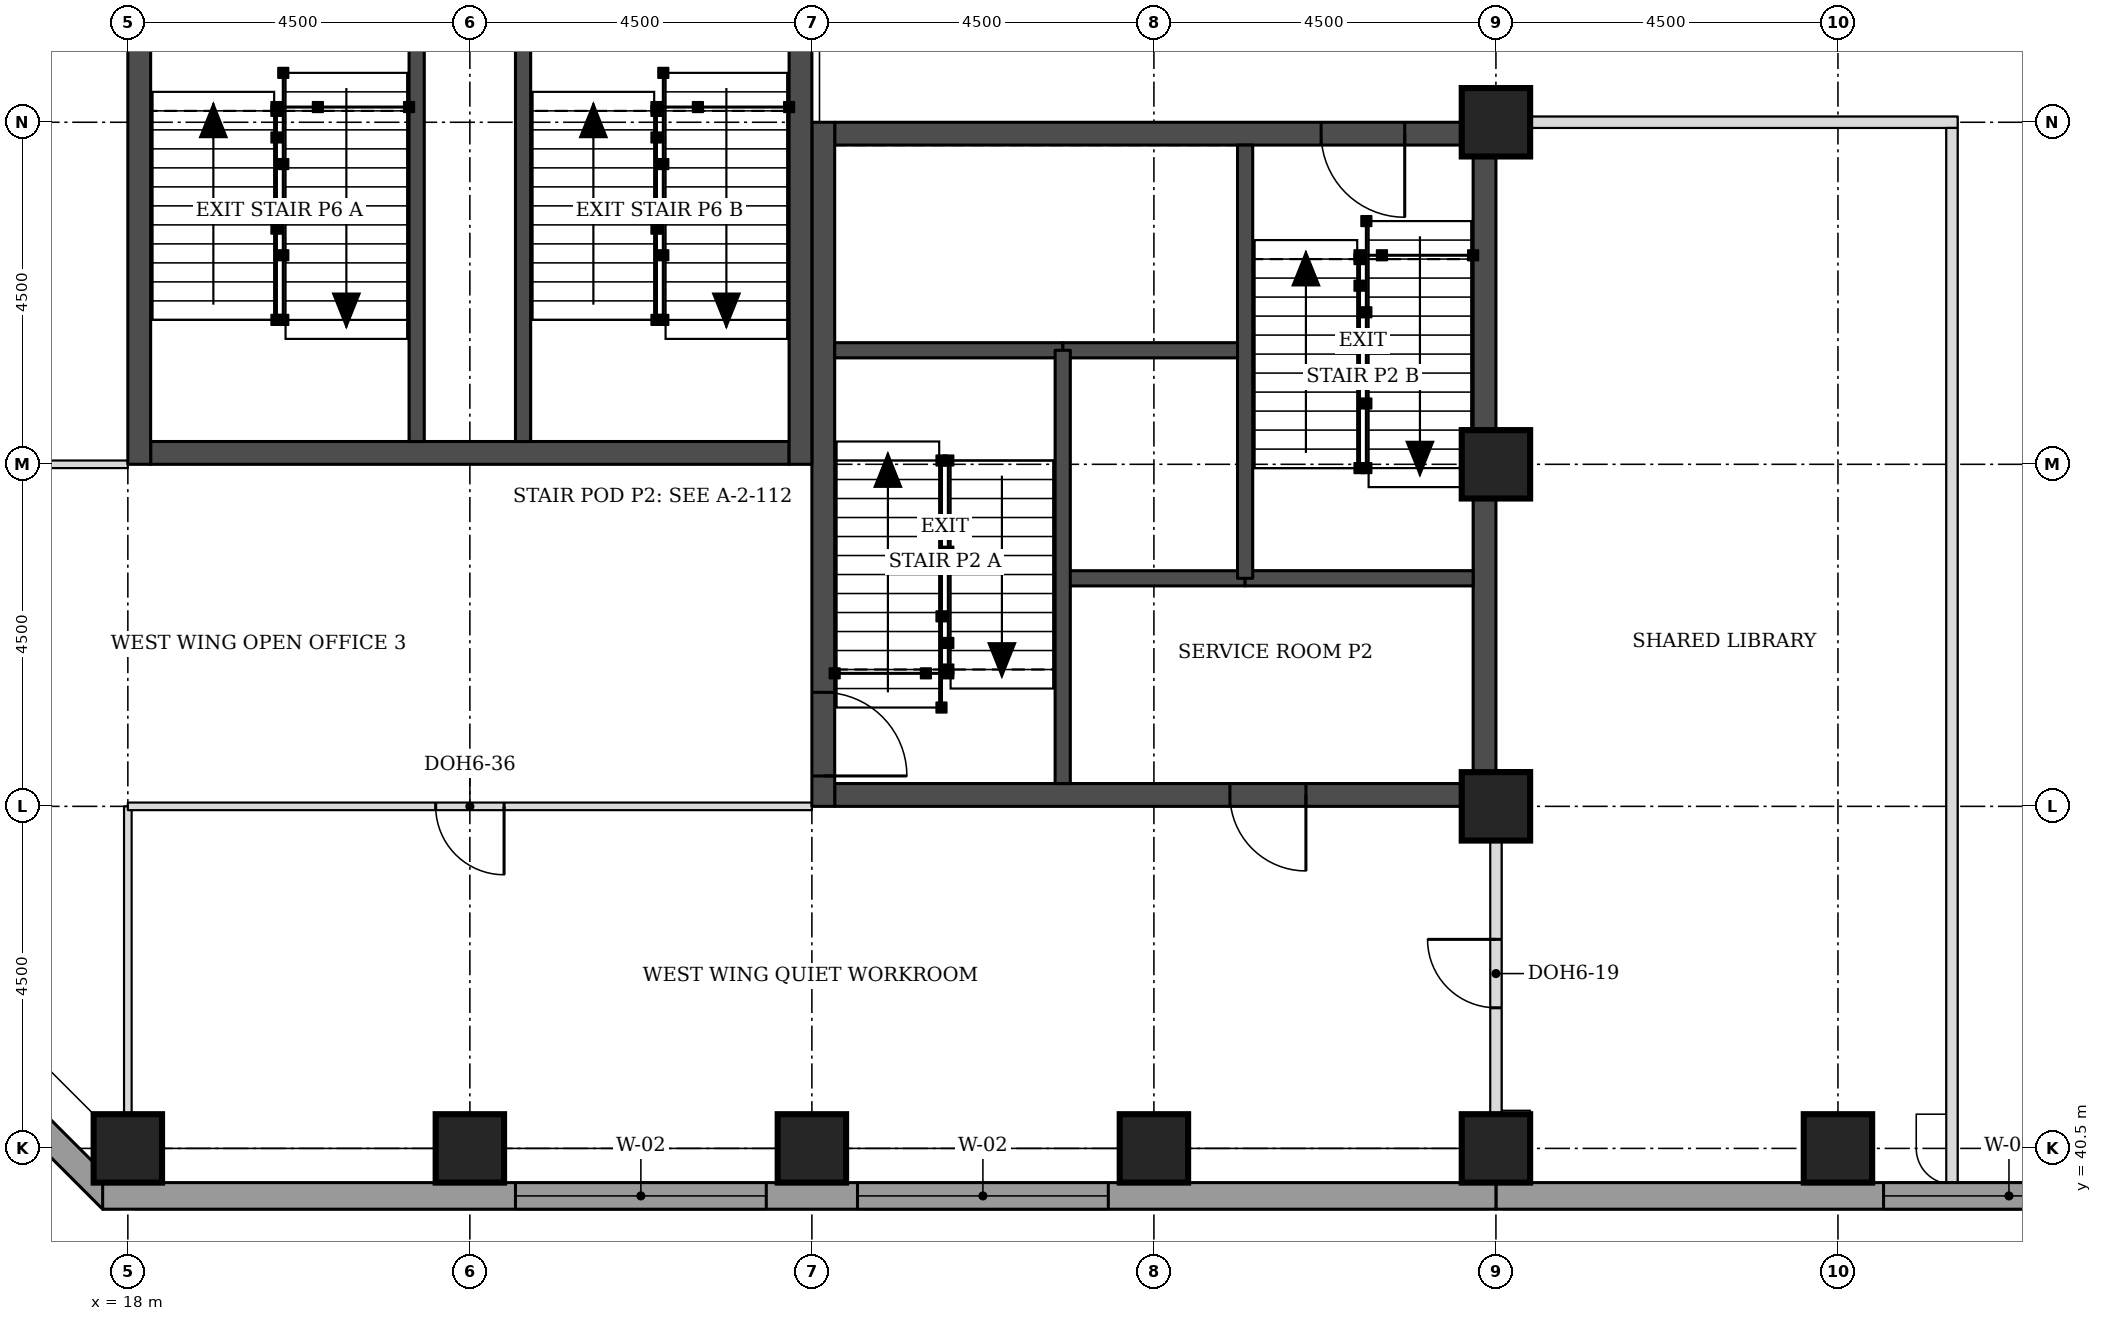
"""IFC4 building model, lengths in metres.
Left out: names, types, materials, properties, quantities, classifications, styles, units other than length and angle.
Written with IfcOpenShell. Run it as: python <this file> out.ifc"""

import sys

from ifc_helpers import new_model, si_unit, direction, frame, frame_2d, origin, origin_2d, place, context, subcontext, project, spatial, rectangle, extrude, element, fill, save


model = new_model("IFC4")
c1 = context("Model", 3, precision=1e-05, world=origin(), true_north=direction((0.0, 1.0)))
c2 = subcontext(c1, "Body", "Model", "MODEL_VIEW")
j1 = project(units=[si_unit("LENGTHUNIT", "METRE"), si_unit("PLANEANGLEUNIT", "RADIAN")], contexts=[c1])
p1 = place(None, origin())
s1 = spatial("IfcSite", under=j1, at=p1, CompositionType="ELEMENT")
p2 = place(p1, origin())
s2 = spatial("IfcBuilding", under=s1, at=p2, CompositionType="ELEMENT")
p3 = place(p2, frame((0.0, 0.0, 188.4)))
s3 = spatial("IfcBuildingStorey", under=s2, at=p3, CompositionType="ELEMENT", Elevation=188.4)
for number, where, z_axis, x_axis in (
    (1, (18.0, 40.5, 0.0), (0.0, 0.0, 1.0), (1.0, 0.0, 0.0)),
    (2, (22.5, 40.5, 0.0), (0.0, 0.0, 1.0), (1.0, 0.0, 0.0)),
    (3, (27.0, 40.5, 0.0), (0.0, 0.0, 1.0), (1.0, 0.0, 0.0)),
    (4, (31.5, 40.5, 0.0), (0.0, 0.0, 1.0), (1.0, 0.0, 0.0)),
    (5, (36.0, 40.5, 0.0), (0.0, 0.0, 1.0), (1.0, 0.0, 0.0)),
    (6, (40.5, 40.5, 0.0), (0.0, 0.0, 1.0), (1.0, 0.0, 0.0)),
    (7, (36.0, 45.0, 0.0), (0.0, 0.0, 1.0), (1.0, 0.0, 0.0)),
    (8, (36.0, 49.5, 0.0), (0.0, 0.0, 1.0), (1.0, 0.0, 0.0)),
    (9, (36.0, 54.0, 0.0), (0.0, 0.0, 1.0), (1.0, 0.0, 0.0)),
):
    element("IfcColumn", number, at=place(p3, frame(where, z_axis=z_axis, x_axis=x_axis)), inside=s3, PredefinedType="COLUMN", context=c2, shape_type="SweptSolid", body=[
        extrude(rectangle(XDim=0.9, YDim=0.9, at=origin_2d()), origin(), (0.0, 0.0, 1.0), 3.7),
    ])
p4 = place(p3, frame((27.3, 45.15, 0.0), z_axis=(0.0, 0.0, 1.0), x_axis=(1.0, 0.0, 0.0)))
e10 = element("IfcWall", 10, at=p4, inside=s3, PredefinedType="SHEAR", context=c2, shape_type="SweptSolid", body=[
    extrude(rectangle(XDim=8.4, YDim=0.3, at=frame_2d((4.2, 0.0))), origin(), (0.0, 0.0, 1.0), 3.7),
])
p5 = place(p4, frame((5.2, 0.0, 0.0)))
e11 = element("IfcOpeningElement", 11, at=p5, cuts=e10, PredefinedType="OPENING", context=c2, shape_type="SweptSolid", body=[
    extrude(rectangle(XDim=1.0, YDim=2.1, at=frame_2d((0.5, 1.05))), frame((0.0, 0.16, 0.0), z_axis=(0.0, -1.0, 0.0), x_axis=(1.0, 0.0, 0.0)), (0.0, 0.0, 1.0), 0.32),
])
p6 = place(p3, frame((27.3, 53.85, 0.0), z_axis=(0.0, 0.0, 1.0), x_axis=(1.0, 0.0, 0.0)))
e12 = element("IfcWall", 12, at=p6, inside=s3, PredefinedType="SHEAR", context=c2, shape_type="SweptSolid", body=[
    extrude(rectangle(XDim=8.4, YDim=0.3, at=frame_2d((4.2, 0.0))), origin(), (0.0, 0.0, 1.0), 3.7),
])
p7 = place(p6, frame((6.4, 0.0, 0.0)))
e13 = element("IfcOpeningElement", 13, at=p7, cuts=e12, PredefinedType="OPENING", context=c2, shape_type="SweptSolid", body=[
    extrude(rectangle(XDim=1.1, YDim=2.1, at=frame_2d((0.55, 1.05))), frame((0.0, 0.16, 0.0), z_axis=(0.0, -1.0, 0.0), x_axis=(1.0, 0.0, 0.0)), (0.0, 0.0, 1.0), 0.32),
])
p8 = place(p3, frame((27.15, 45.0, 0.0), z_axis=(0.0, 0.0, 1.0), x_axis=(0.0, 1.0, 0.0)))
e14 = element("IfcWall", 14, at=p8, inside=s3, PredefinedType="SHEAR", context=c2, shape_type="SweptSolid", body=[
    extrude(rectangle(XDim=9.0, YDim=0.3, at=frame_2d((4.5, 0.0))), origin(), (0.0, 0.0, 1.0), 3.7),
])
p9 = place(p8, frame((0.4, 0.0, 0.0)))
e15 = element("IfcOpeningElement", 15, at=p9, cuts=e14, PredefinedType="OPENING", context=c2, shape_type="SweptSolid", body=[
    extrude(rectangle(XDim=1.1, YDim=2.1, at=frame_2d((0.55, 1.05))), frame((0.0, 0.16, 0.0), z_axis=(0.0, -1.0, 0.0), x_axis=(1.0, 0.0, 0.0)), (0.0, 0.0, 1.0), 0.32),
])
p10 = place(p3, frame((35.85, 45.0, 0.0), z_axis=(0.0, 0.0, 1.0), x_axis=(0.0, 1.0, 0.0)))
e16 = element("IfcWall", 16, at=p10, inside=s3, PredefinedType="SHEAR", context=c2, shape_type="SweptSolid", body=[
    extrude(rectangle(XDim=9.0, YDim=0.3, at=frame_2d((4.5, 0.0))), origin(), (0.0, 0.0, 1.0), 3.7),
])
p11 = place(p3, frame((18.3, 49.65, 0.0), z_axis=(0.0, 0.0, 1.0), x_axis=(1.0, 0.0, 0.0)))
e17 = element("IfcWall", 17, at=p11, inside=s3, PredefinedType="SHEAR", context=c2, shape_type="SweptSolid", body=[
    extrude(rectangle(XDim=8.4, YDim=0.3, at=frame_2d((4.2, 0.0))), origin(), (0.0, 0.0, 1.0), 3.7),
])
p12 = place(p3, frame((18.15, 49.5, 0.0), z_axis=(0.0, 0.0, 1.0), x_axis=(0.0, 1.0, 0.0)))
e18 = element("IfcWall", 18, at=p12, inside=s3, PredefinedType="SHEAR", context=c2, shape_type="SweptSolid", body=[
    extrude(rectangle(XDim=9.0, YDim=0.3, at=frame_2d((4.5, 0.0))), origin(), (0.0, 0.0, 1.0), 3.7),
])
p13 = place(p3, frame((26.85, 49.5, 0.0), z_axis=(0.0, 0.0, 1.0), x_axis=(0.0, 1.0, 0.0)))
e19 = element("IfcWall", 19, at=p13, inside=s3, PredefinedType="SHEAR", context=c2, shape_type="SweptSolid", body=[
    extrude(rectangle(XDim=9.0, YDim=0.3, at=frame_2d((4.5, 0.0))), origin(), (0.0, 0.0, 1.0), 3.7),
])
p14 = place(p13, frame((6.6, 0.0, 0.0)))
e20 = element("IfcOpeningElement", 20, at=p14, cuts=e19, PredefinedType="OPENING", context=c2, shape_type="SweptSolid", body=[
    extrude(rectangle(XDim=1.8, YDim=2.1, at=frame_2d((0.9, 1.05))), frame((0.0, 0.16, 0.0), z_axis=(0.0, -1.0, 0.0), x_axis=(1.0, 0.0, 0.0)), (0.0, 0.0, 1.0), 0.32),
])
p15 = place(p3, frame((36.0, 39.875, 0.0), z_axis=(0.0, 0.0, 1.0), x_axis=(1.0, 0.0, 0.0)))
e21 = element("IfcWall", 21, at=p15, inside=s3, PredefinedType="STANDARD", context=c2, shape_type="SweptSolid", body=[
    extrude(rectangle(XDim=36.331, YDim=0.35, at=frame_2d((18.166, 0.0))), origin(), (0.0, 0.0, 1.0), 3.525),
])
p16 = place(p15, frame((5.1, 0.0, 0.9)))
e22 = element("IfcOpeningElement", 22, at=p16, cuts=e21, PredefinedType="OPENING", context=c2, shape_type="SweptSolid", body=[
    extrude(rectangle(XDim=3.3, YDim=1.9, at=frame_2d((1.65, 0.95))), frame((0.0, 0.185, 0.0), z_axis=(0.0, -1.0, 0.0), x_axis=(1.0, 0.0, 0.0)), (0.0, 0.0, 1.0), 0.37),
])
p17 = place(p15, frame((9.6, 0.0, 0.9)))
e23 = element("IfcOpeningElement", 23, at=p17, cuts=e21, PredefinedType="OPENING", context=c2, shape_type="SweptSolid", body=[
    extrude(rectangle(XDim=3.3, YDim=1.9, at=frame_2d((1.65, 0.95))), frame((0.0, 0.185, 0.0), z_axis=(0.0, -1.0, 0.0), x_axis=(1.0, 0.0, 0.0)), (0.0, 0.0, 1.0), 0.37),
])
p18 = place(p15, frame((14.1, 0.0, 0.9)))
e24 = element("IfcOpeningElement", 24, at=p18, cuts=e21, PredefinedType="OPENING", context=c2, shape_type="SweptSolid", body=[
    extrude(rectangle(XDim=3.3, YDim=1.9, at=frame_2d((1.65, 0.95))), frame((0.0, 0.185, 0.0), z_axis=(0.0, -1.0, 0.0), x_axis=(1.0, 0.0, 0.0)), (0.0, 0.0, 1.0), 0.37),
])
p19 = place(p15, frame((18.6, 0.0, 0.9)))
e25 = element("IfcOpeningElement", 25, at=p19, cuts=e21, PredefinedType="OPENING", context=c2, shape_type="SweptSolid", body=[
    extrude(rectangle(XDim=3.3, YDim=1.9, at=frame_2d((1.65, 0.95))), frame((0.0, 0.185, 0.0), z_axis=(0.0, -1.0, 0.0), x_axis=(1.0, 0.0, 0.0)), (0.0, 0.0, 1.0), 0.37),
])
p20 = place(p15, frame((23.1, 0.0, 0.9)))
e26 = element("IfcOpeningElement", 26, at=p20, cuts=e21, PredefinedType="OPENING", context=c2, shape_type="SweptSolid", body=[
    extrude(rectangle(XDim=3.3, YDim=1.9, at=frame_2d((1.65, 0.95))), frame((0.0, 0.185, 0.0), z_axis=(0.0, -1.0, 0.0), x_axis=(1.0, 0.0, 0.0)), (0.0, 0.0, 1.0), 0.37),
])
p21 = place(p15, frame((27.6, 0.0, 0.9)))
e27 = element("IfcOpeningElement", 27, at=p21, cuts=e21, PredefinedType="OPENING", context=c2, shape_type="SweptSolid", body=[
    extrude(rectangle(XDim=3.3, YDim=1.9, at=frame_2d((1.65, 0.95))), frame((0.0, 0.185, 0.0), z_axis=(0.0, -1.0, 0.0), x_axis=(1.0, 0.0, 0.0)), (0.0, 0.0, 1.0), 0.37),
])
p22 = place(p3, frame((12.824, 44.792, 0.0), z_axis=(0.0, 0.0, 1.0), x_axis=(0.707106781187, -0.707106781187, 0.0)))
e28 = element("IfcWall", 28, at=p22, inside=s3, PredefinedType="STANDARD", context=c2, shape_type="SweptSolid", body=[
    extrude(rectangle(XDim=7.027, YDim=0.35, at=frame_2d((3.513, 0.0))), origin(), (0.0, 0.0, 1.0), 3.525),
])
p23 = place(p22, frame((1.863, 0.0, 0.9)))
e29 = element("IfcOpeningElement", 29, at=p23, cuts=e28, PredefinedType="OPENING", context=c2, shape_type="SweptSolid", body=[
    extrude(rectangle(XDim=3.3, YDim=1.9, at=frame_2d((1.65, 0.95))), frame((0.0, 0.185, 0.0), z_axis=(0.0, -1.0, 0.0), x_axis=(1.0, 0.0, 0.0)), (0.0, 0.0, 1.0), 0.37),
])
p24 = place(p3, frame((17.669, 39.875, 0.0), z_axis=(0.0, 0.0, 1.0), x_axis=(1.0, 0.0, 0.0)))
e30 = element("IfcWall", 30, at=p24, inside=s3, PredefinedType="STANDARD", context=c2, shape_type="SweptSolid", body=[
    extrude(rectangle(XDim=18.331, YDim=0.35, at=frame_2d((9.166, 0.0))), origin(), (0.0, 0.0, 1.0), 3.525),
])
p25 = place(p24, frame((5.431, 0.0, 0.9)))
e31 = element("IfcOpeningElement", 31, at=p25, cuts=e30, PredefinedType="OPENING", context=c2, shape_type="SweptSolid", body=[
    extrude(rectangle(XDim=3.3, YDim=1.9, at=frame_2d((1.65, 0.95))), frame((0.0, 0.185, 0.0), z_axis=(0.0, -1.0, 0.0), x_axis=(1.0, 0.0, 0.0)), (0.0, 0.0, 1.0), 0.37),
])
p26 = place(p24, frame((9.931, 0.0, 0.9)))
e32 = element("IfcOpeningElement", 32, at=p26, cuts=e30, PredefinedType="OPENING", context=c2, shape_type="SweptSolid", body=[
    extrude(rectangle(XDim=3.3, YDim=1.9, at=frame_2d((1.65, 0.95))), frame((0.0, 0.185, 0.0), z_axis=(0.0, -1.0, 0.0), x_axis=(1.0, 0.0, 0.0)), (0.0, 0.0, 1.0), 0.37),
])
p27 = place(p3, frame((36.45, 54.0, 0.0), z_axis=(0.0, 0.0, 1.0), x_axis=(1.0, 0.0, 0.0)))
e33 = element("IfcWall", 33, at=p27, inside=s3, PredefinedType="PARTITIONING", context=c2, shape_type="SweptSolid", body=[
    extrude(rectangle(XDim=5.625, YDim=0.15, at=frame_2d((2.812, 0.0))), origin(), (0.0, 0.0, 1.0), 3.55),
])
p28 = place(p3, frame((42.0, 40.05, 0.0), z_axis=(0.0, 0.0, 1.0), x_axis=(0.0, 1.0, 0.0)))
e34 = element("IfcWall", 34, at=p28, inside=s3, PredefinedType="PARTITIONING", context=c2, shape_type="SweptSolid", body=[
    extrude(rectangle(XDim=13.875, YDim=0.15, at=frame_2d((6.938, 0.0))), origin(), (0.0, 0.0, 1.0), 3.55),
])
p29 = place(p3, frame((36.0, 40.95, 0.0), z_axis=(0.0, 0.0, 1.0), x_axis=(0.0, 1.0, 0.0)))
e35 = element("IfcWall", 35, at=p29, inside=s3, PredefinedType="PARTITIONING", context=c2, shape_type="SweptSolid", body=[
    extrude(rectangle(XDim=3.63, YDim=0.15, at=frame_2d((1.815, 0.0))), origin(), (0.0, 0.0, 1.0), 2.8),
])
p30 = place(p29, frame((1.4, 0.0, 0.0)))
e36 = element("IfcOpeningElement", 36, at=p30, cuts=e35, PredefinedType="OPENING", context=c2, shape_type="SweptSolid", body=[
    extrude(rectangle(XDim=0.9, YDim=2.1, at=frame_2d((0.45, 1.05))), frame((0.0, 0.085, 0.0), z_axis=(0.0, -1.0, 0.0), x_axis=(1.0, 0.0, 0.0)), (0.0, 0.0, 1.0), 0.17),
])
p31 = place(p3, frame((13.5, 49.5, 0.0), z_axis=(0.0, 0.0, 1.0), x_axis=(1.0, 0.0, 0.0)))
e37 = element("IfcWall", 37, at=p31, inside=s3, PredefinedType="PARTITIONING", context=c2, shape_type="SweptSolid", body=[
    extrude(rectangle(XDim=4.5, YDim=0.1, at=frame_2d((2.25, 0.0))), origin(), (0.0, 0.0, 1.0), 3.55),
])
p32 = place(p31, frame((1.8, 0.0, 0.0)))
e38 = element("IfcOpeningElement", 38, at=p32, cuts=e37, PredefinedType="OPENING", context=c2, shape_type="SweptSolid", body=[
    extrude(rectangle(XDim=0.9, YDim=2.1, at=frame_2d((0.45, 1.05))), frame((0.0, 0.06, 0.0), z_axis=(0.0, -1.0, 0.0), x_axis=(1.0, 0.0, 0.0)), (0.0, 0.0, 1.0), 0.12),
])
p33 = place(p3, frame((18.0, 40.5, 0.0), z_axis=(0.0, 0.0, 1.0), x_axis=(0.0, 1.0, 0.0)))
e39 = element("IfcWall", 39, at=p33, inside=s3, PredefinedType="PARTITIONING", context=c2, shape_type="SweptSolid", body=[
    extrude(rectangle(XDim=4.5, YDim=0.1, at=frame_2d((2.25, 0.0))), origin(), (0.0, 0.0, 1.0), 3.55),
])
p34 = place(p3, frame((18.0, 45.0, 0.0), z_axis=(0.0, 0.0, 1.0), x_axis=(1.0, 0.0, 0.0)))
e40 = element("IfcWall", 40, at=p34, inside=s3, PredefinedType="PARTITIONING", context=c2, shape_type="SweptSolid", body=[
    extrude(rectangle(XDim=9.0, YDim=0.1, at=frame_2d((4.5, 0.0))), origin(), (0.0, 0.0, 1.0), 2.55),
])
p35 = place(p34, frame((4.05, 0.0, 0.0)))
e41 = element("IfcOpeningElement", 41, at=p35, cuts=e40, PredefinedType="OPENING", context=c2, shape_type="SweptSolid", body=[
    extrude(rectangle(XDim=0.9, YDim=2.1, at=frame_2d((0.45, 1.05))), frame((0.0, 0.06, 0.0), z_axis=(0.0, -1.0, 0.0), x_axis=(1.0, 0.0, 0.0)), (0.0, 0.0, 1.0), 0.12),
])
p36 = place(p3, frame((30.3, 48.0, 0.0), z_axis=(0.0, 0.0, 1.0), x_axis=(1.0, 0.0, 0.0)))
e42 = element("IfcWall", 42, at=p36, inside=s3, PredefinedType="SOLIDWALL", context=c2, shape_type="SweptSolid", body=[
    extrude(rectangle(XDim=2.4, YDim=0.2, at=frame_2d((1.2, 0.0))), origin(), (0.0, 0.0, 1.0), 3.55),
])
p37 = place(p3, frame((32.7, 48.0, 0.0), z_axis=(0.0, 0.0, 1.0), x_axis=(1.0, 0.0, 0.0)))
e43 = element("IfcWall", 43, at=p37, inside=s3, PredefinedType="SOLIDWALL", context=c2, shape_type="SweptSolid", body=[
    extrude(rectangle(XDim=3.0, YDim=0.2, at=frame_2d((1.5, 0.0))), origin(), (0.0, 0.0, 1.0), 3.55),
])
p38 = place(p3, frame((30.3, 51.0, 0.0), z_axis=(0.0, 0.0, 1.0), x_axis=(1.0, 0.0, 0.0)))
e44 = element("IfcWall", 44, at=p38, inside=s3, PredefinedType="SOLIDWALL", context=c2, shape_type="SweptSolid", body=[
    extrude(rectangle(XDim=2.4, YDim=0.2, at=frame_2d((1.2, 0.0))), origin(), (0.0, 0.0, 1.0), 3.7),
])
p39 = place(p3, frame((27.3, 51.0, 0.0), z_axis=(0.0, 0.0, 1.0), x_axis=(1.0, 0.0, 0.0)))
e45 = element("IfcWall", 45, at=p39, inside=s3, PredefinedType="SOLIDWALL", context=c2, shape_type="SweptSolid", body=[
    extrude(rectangle(XDim=3.0, YDim=0.2, at=frame_2d((1.5, 0.0))), origin(), (0.0, 0.0, 1.0), 3.55),
])
for number, where, z_axis, x_axis in (
    (46, (30.3, 45.3, 0.0), (0.0, 0.0, 1.0), (0.0, 1.0, 0.0)),
    (47, (32.7, 48.0, 0.0), (0.0, 0.0, 1.0), (0.0, 1.0, 0.0)),
):
    element("IfcWall", number, at=place(p3, frame(where, z_axis=z_axis, x_axis=x_axis)), inside=s3, PredefinedType="SOLIDWALL", context=c2, shape_type="SweptSolid", body=[
        extrude(rectangle(XDim=5.7, YDim=0.2, at=frame_2d((2.85, 0.0))), origin(), (0.0, 0.0, 1.0), 3.55),
    ])
for number, where, z_axis, x_axis in (
    (48, (21.8, 49.8, 0.0), (0.0, 0.0, 1.0), (0.0, 1.0, 0.0)),
    (49, (23.2, 49.8, 0.0), (0.0, 0.0, 1.0), (0.0, 1.0, 0.0)),
):
    element("IfcWall", number, at=place(p3, frame(where, z_axis=z_axis, x_axis=x_axis)), inside=s3, PredefinedType="SOLIDWALL", context=c2, shape_type="SweptSolid", body=[
        extrude(rectangle(XDim=6.05, YDim=0.2, at=frame_2d((3.025, 0.0))), origin(), (0.0, 0.0, 1.0), 3.55),
    ])
p40 = place(p16, origin())
e50 = element("IfcWindow", 50, at=p40, inside=s3, PartitioningType="SINGLE_PANEL", PredefinedType="WINDOW", context=c2, shape_type="SweptSolid", body=[
    extrude(rectangle(XDim=3.3, YDim=1.9, at=frame_2d((1.65, 0.95))), frame((0.0, 0.085, 0.0), z_axis=(0.0, -1.0, 0.0), x_axis=(1.0, 0.0, 0.0)), (0.0, 0.0, 1.0), 0.06),
])
fill(e22, e50)
p41 = place(p25, origin())
e51 = element("IfcWindow", 51, at=p41, inside=s3, PartitioningType="SINGLE_PANEL", PredefinedType="WINDOW", context=c2, shape_type="SweptSolid", body=[
    extrude(rectangle(XDim=3.3, YDim=1.9, at=frame_2d((1.65, 0.95))), frame((0.0, 0.085, 0.0), z_axis=(0.0, -1.0, 0.0), x_axis=(1.0, 0.0, 0.0)), (0.0, 0.0, 1.0), 0.06),
])
fill(e31, e51)
p42 = place(p26, origin())
e52 = element("IfcWindow", 52, at=p42, inside=s3, PartitioningType="SINGLE_PANEL", PredefinedType="WINDOW", context=c2, shape_type="SweptSolid", body=[
    extrude(rectangle(XDim=3.3, YDim=1.9, at=frame_2d((1.65, 0.95))), frame((0.0, 0.085, 0.0), z_axis=(0.0, -1.0, 0.0), x_axis=(1.0, 0.0, 0.0)), (0.0, 0.0, 1.0), 0.06),
])
fill(e32, e52)
p43 = place(p30, origin())
e53 = element("IfcDoor", 53, at=p43, inside=s3, OperationType="SINGLE_SWING_RIGHT", PredefinedType="DOOR", context=c2, shape_type="SweptSolid", body=[
    extrude(rectangle(XDim=0.9, YDim=2.1, at=frame_2d((0.45, 1.05))), frame((0.0, 0.025, 0.0), z_axis=(0.0, -1.0, 0.0), x_axis=(1.0, 0.0, 0.0)), (0.0, 0.0, 1.0), 0.05),
])
fill(e36, e53)
p44 = place(p35, frame((0.9, 0.0, 0.0), z_axis=(0.0, 0.0, 1.0), x_axis=(-1.0, 0.0, 0.0)))
e54 = element("IfcDoor", 54, at=p44, inside=s3, OperationType="SINGLE_SWING_LEFT", PredefinedType="DOOR", context=c2, shape_type="SweptSolid", body=[
    extrude(rectangle(XDim=0.9, YDim=2.1, at=frame_2d((0.45, 1.05))), frame((0.0, 0.025, 0.0), z_axis=(0.0, -1.0, 0.0), x_axis=(1.0, 0.0, 0.0)), (0.0, 0.0, 1.0), 0.05),
])
fill(e41, e54)
p45 = place(p9, frame((1.1, 0.0, 0.0), z_axis=(0.0, 0.0, 1.0), x_axis=(-1.0, 0.0, 0.0)))
e55 = element("IfcDoor", 55, at=p45, inside=s3, OperationType="SINGLE_SWING_RIGHT", PredefinedType="DOOR", context=c2, shape_type="SweptSolid", body=[
    extrude(rectangle(XDim=1.1, YDim=2.1, at=frame_2d((0.55, 1.05))), frame((0.0, 0.025, 0.0), z_axis=(0.0, -1.0, 0.0), x_axis=(1.0, 0.0, 0.0)), (0.0, 0.0, 1.0), 0.05),
])
fill(e15, e55)
p46 = place(p7, frame((1.1, 0.0, 0.0), z_axis=(0.0, 0.0, 1.0), x_axis=(-1.0, 0.0, 0.0)))
e56 = element("IfcDoor", 56, at=p46, inside=s3, OperationType="SINGLE_SWING_LEFT", PredefinedType="DOOR", context=c2, shape_type="SweptSolid", body=[
    extrude(rectangle(XDim=1.1, YDim=2.1, at=frame_2d((0.55, 1.05))), frame((0.0, 0.025, 0.0), z_axis=(0.0, -1.0, 0.0), x_axis=(1.0, 0.0, 0.0)), (0.0, 0.0, 1.0), 0.05),
])
fill(e13, e56)
p47 = place(p5, frame((1.0, 0.0, 0.0), z_axis=(0.0, 0.0, 1.0), x_axis=(-1.0, 0.0, 0.0)))
e57 = element("IfcDoor", 57, at=p47, inside=s3, OperationType="SINGLE_SWING_LEFT", PredefinedType="DOOR", context=c2, shape_type="SweptSolid", body=[
    extrude(rectangle(XDim=1.0, YDim=2.1, at=frame_2d((0.5, 1.05))), frame((0.0, 0.025, 0.0), z_axis=(0.0, -1.0, 0.0), x_axis=(1.0, 0.0, 0.0)), (0.0, 0.0, 1.0), 0.05),
])
fill(e11, e57)
save(model, sys.argv[1])
